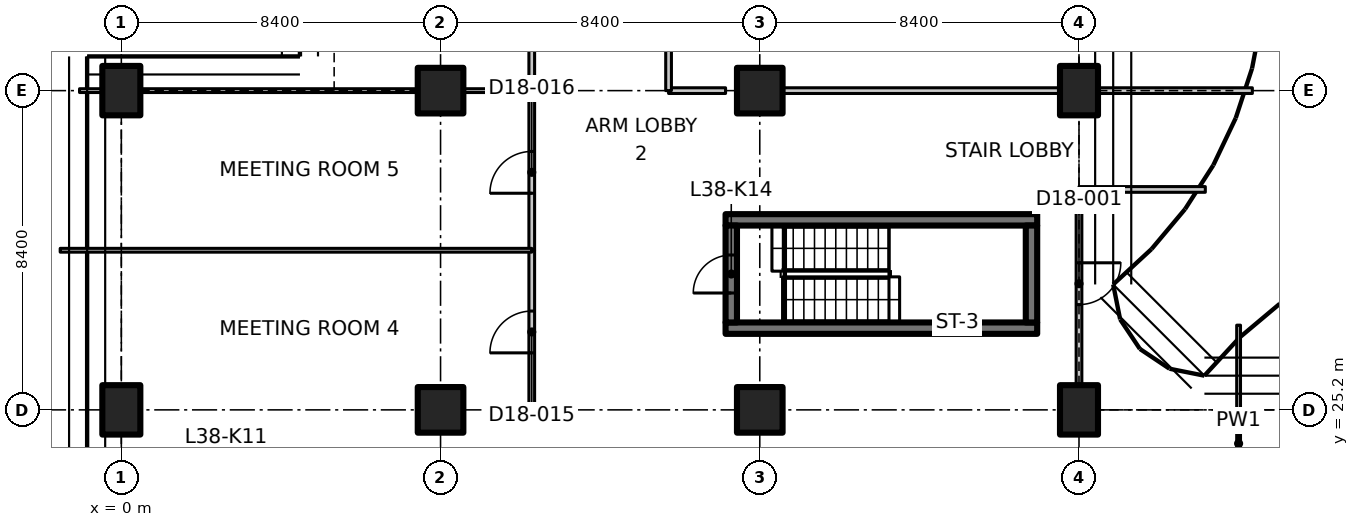
"""IFC4 building model, lengths in metres.
Left out: names, types, materials, properties, quantities, classifications, styles, units other than length and angle.
Written with IfcOpenShell. Run it as: python <this file> out.ifc"""

import sys

from ifc_helpers import new_model, si_unit, direction, frame, frame_2d, origin, origin_2d, place, context, subcontext, project, spatial, polyline, rectangle, outline, extrude, element, fill, save


model = new_model("IFC4")
c1 = context("Model", 3, precision=1e-05, world=origin(), true_north=direction((0.0, 1.0)))
c2 = subcontext(c1, "Body", "Model", "MODEL_VIEW")
j1 = project(units=[si_unit("LENGTHUNIT", "METRE"), si_unit("PLANEANGLEUNIT", "RADIAN")], contexts=[c1])
p1 = place(None, origin())
s1 = spatial("IfcSite", under=j1, at=p1, CompositionType="ELEMENT")
p2 = place(p1, origin())
s2 = spatial("IfcBuilding", under=s1, at=p2, CompositionType="ELEMENT")
p3 = place(p2, frame((0.0, 0.0, 152.9)))
s3 = spatial("IfcBuildingStorey", under=s2, at=p3, CompositionType="ELEMENT", Elevation=152.9)
for number, where, z_axis, x_axis in (
    (1, (0.0, 25.2, 0.0), (0.0, 0.0, 1.0), (1.0, 0.0, 0.0)),
    (2, (0.0, 33.6, 0.0), (0.0, 0.0, 1.0), (1.0, 0.0, 0.0)),
):
    element("IfcColumn", number, at=place(p3, frame(where, z_axis=z_axis, x_axis=x_axis)), inside=s3, PredefinedType="COLUMN", context=c2, shape_type="SweptSolid", body=[
        extrude(rectangle(XDim=1.0, YDim=1.3, at=origin_2d()), origin(), (0.0, 0.0, 1.0), 3.3),
    ])
for number, where, z_axis, x_axis in (
    (3, (8.4, 25.2, 0.0), (0.0, 0.0, 1.0), (1.0, 0.0, 0.0)),
    (4, (8.4, 33.6, 0.0), (0.0, 0.0, 1.0), (1.0, 0.0, 0.0)),
    (5, (16.8, 25.2, 0.0), (0.0, 0.0, 1.0), (1.0, 0.0, 0.0)),
    (6, (16.8, 33.6, 0.0), (0.0, 0.0, 1.0), (1.0, 0.0, 0.0)),
):
    element("IfcColumn", number, at=place(p3, frame(where, z_axis=z_axis, x_axis=x_axis)), inside=s3, PredefinedType="COLUMN", context=c2, shape_type="SweptSolid", body=[
        extrude(rectangle(XDim=1.2, YDim=1.2, at=origin_2d()), origin(), (0.0, 0.0, 1.0), 3.3),
    ])
for number, where, z_axis, x_axis in (
    (7, (25.2, 25.2, 0.0), (0.0, 0.0, 1.0), (1.0, 0.0, 0.0)),
    (8, (25.2, 33.6, 0.0), (0.0, 0.0, 1.0), (1.0, 0.0, 0.0)),
):
    element("IfcColumn", number, at=place(p3, frame(where, z_axis=z_axis, x_axis=x_axis)), inside=s3, PredefinedType="COLUMN", context=c2, shape_type="SweptSolid", body=[
        extrude(rectangle(XDim=1.0, YDim=1.3, at=origin_2d()), origin(), (0.0, 0.0, 1.0), 3.3),
    ])
for number, where, z_axis, x_axis in (
    (9, (15.9, 27.35, 0.0), (0.0, 0.0, 1.0), (1.0, 0.0, 0.0)),
    (10, (15.9, 30.2, 0.0), (0.0, 0.0, 1.0), (1.0, 0.0, 0.0)),
):
    element("IfcWall", number, at=place(p3, frame(where, z_axis=z_axis, x_axis=x_axis)), inside=s3, PredefinedType="SHEAR", context=c2, shape_type="SweptSolid", body=[
        extrude(rectangle(XDim=8.2, YDim=0.3, at=frame_2d((4.1, 0.0))), origin(), (0.0, 0.0, 1.0), 3.3),
    ])
p4 = place(p3, frame((16.05, 27.5, 0.0), z_axis=(0.0, 0.0, 1.0), x_axis=(0.0, 1.0, 0.0)))
e11 = element("IfcWall", 11, at=p4, inside=s3, PredefinedType="SHEAR", context=c2, shape_type="SweptSolid", body=[
    extrude(rectangle(XDim=2.55, YDim=0.3, at=frame_2d((1.275, 0.0))), origin(), (0.0, 0.0, 1.0), 3.3),
])
p5 = place(p4, frame((0.775, 0.0, 0.0)))
e12 = element("IfcOpeningElement", 12, at=p5, cuts=e11, PredefinedType="OPENING", context=c2, shape_type="SweptSolid", body=[
    extrude(rectangle(XDim=1.0, YDim=2.1, at=frame_2d((0.5, 1.05))), frame((0.0, 0.16, 0.0), z_axis=(0.0, -1.0, 0.0), x_axis=(1.0, 0.0, 0.0)), (0.0, 0.0, 1.0), 0.32),
])
p6 = place(p3, frame((23.95, 27.5, 0.0), z_axis=(0.0, 0.0, 1.0), x_axis=(0.0, 1.0, 0.0)))
e13 = element("IfcWall", 13, at=p6, inside=s3, PredefinedType="SHEAR", context=c2, shape_type="SweptSolid", body=[
    extrude(rectangle(XDim=2.55, YDim=0.3, at=frame_2d((1.275, 0.0))), origin(), (0.0, 0.0, 1.0), 3.3),
])
p7 = place(p3, frame((29.4, 27.429, 0.0), z_axis=(0.0, 0.0, 1.0), x_axis=(0.0, -1.0, 0.0)))
e14 = element("IfcWall", 14, at=p7, inside=s3, PredefinedType="PARTITIONING", context=c2, shape_type="SweptSolid", body=[
    extrude(outline(polyline([(0.0, 0.0), (6.229, 0.0), (6.229, 3.28), (2.679, 3.28), (2.677, 2.93), (1.781, 2.93), (1.779, 3.28), (0.154, 3.28), (0.0, 3.28), (0.0, 0.0)])), frame((0.0, 0.05, 0.0), z_axis=(0.0, -1.0, 0.0), x_axis=(1.0, 0.0, 0.0)), (0.0, 0.0, 1.0), 0.1),
])
p8 = place(p3, frame((25.2, 31.0, 0.0), z_axis=(0.0, 0.0, 1.0), x_axis=(0.0, -1.0, 0.0)))
e15 = element("IfcWall", 15, at=p8, inside=s3, PredefinedType="PARTITIONING", context=c2, shape_type="SweptSolid", body=[
    extrude(outline(polyline([(0.0, 0.0), (5.13, 0.0), (5.13, 2.93), (0.0, 2.93), (0.0, 0.0)])), frame((0.0, 0.075, 0.0), z_axis=(0.0, -1.0, 0.0), x_axis=(1.0, 0.0, 0.0)), (0.0, 0.0, 1.0), 0.15),
])
p9 = place(p8, frame((1.93, 0.0, 0.0)))
e16 = element("IfcOpeningElement", 16, at=p9, cuts=e15, PredefinedType="OPENING", context=c2, shape_type="SweptSolid", body=[
    extrude(rectangle(XDim=1.1, YDim=2.1, at=frame_2d((0.55, 1.05))), frame((0.0, 0.085, 0.0), z_axis=(0.0, -1.0, 0.0), x_axis=(1.0, 0.0, 0.0)), (0.0, 0.0, 1.0), 0.17),
])
p10 = place(p3, frame((25.2, 31.0, 0.0), z_axis=(0.0, 0.0, 1.0), x_axis=(1.0, 0.0, 0.0)))
e17 = element("IfcWall", 17, at=p10, inside=s3, PredefinedType="PARTITIONING", context=c2, shape_type="SweptSolid", body=[
    extrude(rectangle(XDim=3.324, YDim=0.15, at=frame_2d((1.662, 0.0))), origin(), (0.0, 0.0, 1.0), 2.93),
])
p11 = place(p3, frame((10.8, 25.2, 0.0), z_axis=(0.0, 0.0, 1.0), x_axis=(0.0, 1.0, 0.0)))
e18 = element("IfcWall", 18, at=p11, inside=s3, PredefinedType="PARTITIONING", context=c2, shape_type="SweptSolid", body=[
    extrude(rectangle(XDim=4.2, YDim=0.15, at=frame_2d((2.1, 0.0))), origin(), (0.0, 0.0, 1.0), 3.28),
])
p12 = place(p11, frame((1.5, 0.0, 0.0)))
e19 = element("IfcOpeningElement", 19, at=p12, cuts=e18, PredefinedType="OPENING", context=c2, shape_type="SweptSolid", body=[
    extrude(rectangle(XDim=1.1, YDim=2.1, at=frame_2d((0.55, 1.05))), frame((0.0, 0.085, 0.0), z_axis=(0.0, -1.0, 0.0), x_axis=(1.0, 0.0, 0.0)), (0.0, 0.0, 1.0), 0.17),
])
p13 = place(p3, frame((10.8, 29.4, 0.0), z_axis=(0.0, 0.0, 1.0), x_axis=(0.0, 1.0, 0.0)))
e20 = element("IfcWall", 20, at=p13, inside=s3, PredefinedType="PARTITIONING", context=c2, shape_type="SweptSolid", body=[
    extrude(rectangle(XDim=4.2, YDim=0.15, at=frame_2d((2.1, 0.0))), origin(), (0.0, 0.0, 1.0), 3.28),
])
p14 = place(p13, frame((1.5, 0.0, 0.0)))
e21 = element("IfcOpeningElement", 21, at=p14, cuts=e20, PredefinedType="OPENING", context=c2, shape_type="SweptSolid", body=[
    extrude(rectangle(XDim=1.1, YDim=2.1, at=frame_2d((0.55, 1.05))), frame((0.0, 0.085, 0.0), z_axis=(0.0, -1.0, 0.0), x_axis=(1.0, 0.0, 0.0)), (0.0, 0.0, 1.0), 0.17),
])
p15 = place(p3, frame((14.4, 33.6, 0.0), z_axis=(0.0, 0.0, 1.0), x_axis=(1.0, 0.0, 0.0)))
e22 = element("IfcWall", 22, at=p15, inside=s3, PredefinedType="PARTITIONING", context=c2, shape_type="SweptSolid", body=[
    extrude(rectangle(XDim=1.5, YDim=0.15, at=frame_2d((0.75, 0.0))), origin(), (0.0, 0.0, 1.0), 3.28),
])
p16 = place(p3, frame((17.42, 33.6, 0.0), z_axis=(0.0, 0.0, 1.0), x_axis=(1.0, 0.0, 0.0)))
e23 = element("IfcWall", 23, at=p16, inside=s3, PredefinedType="PARTITIONING", context=c2, shape_type="SweptSolid", body=[
    extrude(rectangle(XDim=7.26, YDim=0.15, at=frame_2d((3.63, 0.0))), origin(), (0.0, 0.0, 1.0), 3.28),
])
p17 = place(p3, frame((25.72, 33.6, 0.0), z_axis=(0.0, 0.0, 1.0), x_axis=(1.0, 0.0, 0.0)))
e24 = element("IfcWall", 24, at=p17, inside=s3, PredefinedType="PARTITIONING", context=c2, shape_type="SweptSolid", body=[
    extrude(rectangle(XDim=4.042, YDim=0.15, at=frame_2d((2.021, 0.0))), origin(), (0.0, 0.0, 1.0), 2.93),
])
p18 = place(p3, frame((10.8, 33.6, 0.0), z_axis=(0.0, 0.0, 1.0), x_axis=(0.0, 1.0, 0.0)))
e25 = element("IfcWall", 25, at=p18, inside=s3, PredefinedType="PARTITIONING", context=c2, shape_type="SweptSolid", body=[
    extrude(rectangle(XDim=8.4, YDim=0.15, at=frame_2d((4.2, 0.0))), origin(), (0.0, 0.0, 1.0), 3.28),
])
p19 = place(p18, frame((3.6, 0.0, 0.0)))
e26 = element("IfcOpeningElement", 26, at=p19, cuts=e25, PredefinedType="OPENING", context=c2, shape_type="SweptSolid", body=[
    extrude(rectangle(XDim=1.1, YDim=2.1, at=frame_2d((0.55, 1.05))), frame((0.0, 0.085, 0.0), z_axis=(0.0, -1.0, 0.0), x_axis=(1.0, 0.0, 0.0)), (0.0, 0.0, 1.0), 0.17),
])
p20 = place(p3, frame((14.4, 42.0, 0.0), z_axis=(0.0, 0.0, 1.0), x_axis=(0.0, -1.0, 0.0)))
e27 = element("IfcWall", 27, at=p20, inside=s3, PredefinedType="PARTITIONING", context=c2, shape_type="SweptSolid", body=[
    extrude(rectangle(XDim=8.4, YDim=0.15, at=frame_2d((4.2, 0.0))), origin(), (0.0, 0.0, 1.0), 3.28),
])
p21 = place(p3, frame((-1.609, 29.4, 0.0), z_axis=(0.0, 0.0, 1.0), x_axis=(1.0, 0.0, 0.0)))
e28 = element("IfcWall", 28, at=p21, inside=s3, PredefinedType="PARTITIONING", context=c2, shape_type="SweptSolid", body=[
    extrude(outline(polyline([(0.0, 0.0), (12.409, 0.0), (12.409, 3.28), (2.059, 3.28), (2.057, 2.93), (1.161, 2.93), (1.159, 3.28), (0.509, 3.28), (0.0, 3.28), (0.0, 0.0)])), frame((0.0, 0.05, 0.0), z_axis=(0.0, -1.0, 0.0), x_axis=(1.0, 0.0, 0.0)), (0.0, 0.0, 1.0), 0.1),
])
p22 = place(p3, frame((-1.1, 33.6, 0.0), z_axis=(0.0, 0.0, 1.0), x_axis=(1.0, 0.0, 0.0)))
e29 = element("IfcWall", 29, at=p22, inside=s3, PredefinedType="PARTITIONING", context=c2, shape_type="SweptSolid", body=[
    extrude(rectangle(XDim=0.58, YDim=0.1, at=frame_2d((0.29, 0.0))), origin(), (0.0, 0.0, 1.0), 3.28),
])
p23 = place(p3, frame((0.52, 33.6, 0.0), z_axis=(0.0, 0.0, 1.0), x_axis=(1.0, 0.0, 0.0)))
e30 = element("IfcWall", 30, at=p23, inside=s3, PredefinedType="PARTITIONING", context=c2, shape_type="SweptSolid", body=[
    extrude(outline(polyline([(0.0, 0.0), (7.26, 0.0), (7.26, 2.93), (0.0, 2.93), (0.0, 0.0)])), frame((0.0, 0.05, 0.0), z_axis=(0.0, -1.0, 0.0), x_axis=(1.0, 0.0, 0.0)), (0.0, 0.0, 1.0), 0.1),
])
p24 = place(p3, frame((9.02, 33.6, 0.0), z_axis=(0.0, 0.0, 1.0), x_axis=(1.0, 0.0, 0.0)))
e31 = element("IfcWall", 31, at=p24, inside=s3, PredefinedType="PARTITIONING", context=c2, shape_type="SweptSolid", body=[
    extrude(rectangle(XDim=1.78, YDim=0.1, at=frame_2d((0.89, 0.0))), origin(), (0.0, 0.0, 1.0), 3.28),
])
p25 = place(p5, origin())
e32 = element("IfcDoor", 32, at=p25, inside=s3, OperationType="SINGLE_SWING_RIGHT", PredefinedType="DOOR", context=c2, shape_type="SweptSolid", body=[
    extrude(rectangle(XDim=1.0, YDim=2.1, at=frame_2d((0.5, 1.05))), frame((0.0, 0.025, 0.0), z_axis=(0.0, -1.0, 0.0), x_axis=(1.0, 0.0, 0.0)), (0.0, 0.0, 1.0), 0.05),
])
fill(e12, e32)
p26 = place(p9, origin())
e33 = element("IfcDoor", 33, at=p26, inside=s3, OperationType="SINGLE_SWING_RIGHT", PredefinedType="DOOR", context=c2, shape_type="SweptSolid", body=[
    extrude(rectangle(XDim=1.1, YDim=2.1, at=frame_2d((0.55, 1.05))), frame((0.0, 0.025, 0.0), z_axis=(0.0, -1.0, 0.0), x_axis=(1.0, 0.0, 0.0)), (0.0, 0.0, 1.0), 0.05),
])
fill(e16, e33)
p27 = place(p12, origin())
e34 = element("IfcDoor", 34, at=p27, inside=s3, OperationType="SINGLE_SWING_LEFT", PredefinedType="DOOR", context=c2, shape_type="SweptSolid", body=[
    extrude(rectangle(XDim=1.1, YDim=2.1, at=frame_2d((0.55, 1.05))), frame((0.0, 0.025, 0.0), z_axis=(0.0, -1.0, 0.0), x_axis=(1.0, 0.0, 0.0)), (0.0, 0.0, 1.0), 0.05),
])
fill(e19, e34)
p28 = place(p14, origin())
e35 = element("IfcDoor", 35, at=p28, inside=s3, OperationType="SINGLE_SWING_LEFT", PredefinedType="DOOR", context=c2, shape_type="SweptSolid", body=[
    extrude(rectangle(XDim=1.1, YDim=2.1, at=frame_2d((0.55, 1.05))), frame((0.0, 0.025, 0.0), z_axis=(0.0, -1.0, 0.0), x_axis=(1.0, 0.0, 0.0)), (0.0, 0.0, 1.0), 0.05),
])
fill(e21, e35)
save(model, sys.argv[1])
